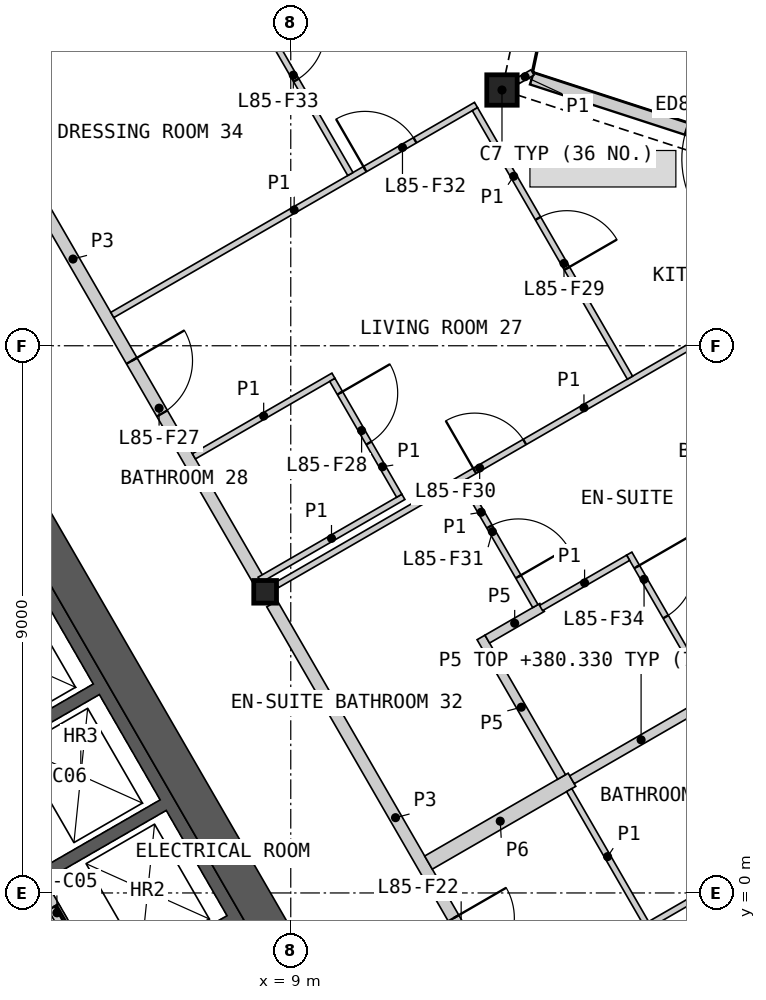
"""IFC4 building model, lengths in metres.
Left out: names, types, materials, properties, quantities, classifications, styles, units other than length and angle.
Written with IfcOpenShell. Run it as: python <this file> out.ifc"""

import sys

from ifc_helpers import new_model, si_unit, direction, frame, frame_2d, origin, origin_2d, place, context, subcontext, project, spatial, polyline, rectangle, hollow_rectangle, i_section, outline, extrude, element, fill, save


model = new_model("IFC4")
c1 = context("Model", 3, precision=1e-05, world=origin(), true_north=direction((0.0, 1.0)))
c2 = subcontext(c1, "Body", "Model", "MODEL_VIEW")
j1 = project(units=[si_unit("LENGTHUNIT", "METRE"), si_unit("PLANEANGLEUNIT", "RADIAN")], contexts=[c1])
p1 = place(None, origin())
s1 = spatial("IfcSite", under=j1, at=p1, CompositionType="ELEMENT")
p2 = place(p1, origin())
s2 = spatial("IfcBuilding", under=s1, at=p2, CompositionType="ELEMENT")
p3 = place(p2, frame((0.0, 0.0, 378.0)))
s3 = spatial("IfcBuildingStorey", under=s2, at=p3, CompositionType="ELEMENT", Elevation=378.0)
p4 = place(p3, frame((12.474, 13.206, 0.0), z_axis=(0.0, 0.0, 1.0), x_axis=(1.0, 0.0, 0.0)))
e1 = element("IfcColumn", 1, at=p4, inside=s3, PredefinedType="COLUMN", context=c2, shape_type="SweptSolid", body=[
    extrude(hollow_rectangle(XDim=0.5, YDim=0.5, WallThickness=0.03, at=origin_2d()), origin(), (0.0, 0.0, 1.0), 3.4),
])
p5 = place(p3, frame((8.578, 4.953, 0.0), z_axis=(0.0, 0.0, 1.0), x_axis=(1.0, 0.0, 0.0)))
e2 = element("IfcColumn", 2, at=p5, inside=s3, PredefinedType="COLUMN", context=c2, shape_type="SweptSolid", body=[
    extrude(i_section(OverallWidth=0.374, OverallDepth=0.372, WebThickness=0.016, FlangeThickness=0.026, at=origin_2d()), origin(), (0.0, 0.0, 1.0), 3.4),
])
p6 = place(p3, frame((19.25, 11.351, 0.0), z_axis=(0.0, 0.0, 1.0), x_axis=(-0.951060668786, 0.309004214029, 0.0)))
e3 = element("IfcWall", 3, at=p6, inside=s3, PredefinedType="SOLIDWALL", context=c2, shape_type="SweptSolid", body=[
    extrude(rectangle(XDim=6.609, YDim=0.2, at=frame_2d((3.305, 0.0))), origin(), (0.0, 0.0, 1.0), 2.634),
])
p7 = place(p6, frame((2.333, 0.0, 0.0)))
e4 = element("IfcOpeningElement", 4, at=p7, cuts=e3, PredefinedType="OPENING", context=c2, shape_type="SweptSolid", body=[
    extrude(rectangle(XDim=1.6, YDim=2.25, at=frame_2d((0.8, 1.125))), frame((0.0, 0.11, 0.0), z_axis=(0.0, -1.0, 0.0), x_axis=(1.0, 0.0, 0.0)), (0.0, 0.0, 1.0), 0.22),
])
p8 = place(p3, origin())
e5 = element("IfcWall", 5, at=p8, inside=s3, PredefinedType="SHEAR", context=c2, shape_type="SweptSolid", body=[
    extrude(outline(polyline([(1.561, 6.097), (3.731, 7.35), (8.231, -0.444), (6.061, -1.697), (5.96, -1.524), (7.952, -0.374), (6.952, 1.358), (4.96, 0.208), (4.861, 0.381), (6.852, 1.531), (5.852, 3.263), (3.861, 2.113), (3.76, 2.287), (5.752, 3.437), (4.752, 5.169), (2.76, 4.019), (2.66, 4.192), (4.652, 5.342), (3.652, 7.074), (1.66, 5.924), (1.561, 6.097)])), origin(), (0.0, 0.0, 1.0), 3.1),
])
p9 = place(p3, frame((5.817, -1.476, 0.0), z_axis=(0.0, 0.0, 1.0), x_axis=(-0.500002616675, 0.866023893041, 0.0)))
e6 = element("IfcWall", 6, at=p9, inside=s3, PredefinedType="SOLIDWALL", context=c2, shape_type="SweptSolid", body=[
    extrude(rectangle(XDim=8.373, YDim=0.2, at=frame_2d((4.187, 0.0))), origin(), (0.0, 0.0, 1.0), 3.1),
])
p10 = place(p9, frame((0.337, 0.0, 0.0)))
e7 = element("IfcOpeningElement", 7, at=p10, cuts=e6, PredefinedType="OPENING", context=c2, shape_type="SweptSolid", body=[
    extrude(rectangle(XDim=1.1, YDim=2.1, at=frame_2d((0.55, 1.05))), frame((0.0, 0.11, 0.0), z_axis=(0.0, -1.0, 0.0), x_axis=(1.0, 0.0, 0.0)), (0.0, 0.0, 1.0), 0.22),
])
p11 = place(p9, frame((2.537, 0.0, 0.0)))
e8 = element("IfcOpeningElement", 8, at=p11, cuts=e6, PredefinedType="OPENING", context=c2, shape_type="SweptSolid", body=[
    extrude(rectangle(XDim=1.1, YDim=2.1, at=frame_2d((0.55, 1.05))), frame((0.0, 0.11, 0.0), z_axis=(0.0, -1.0, 0.0), x_axis=(1.0, 0.0, 0.0)), (0.0, 0.0, 1.0), 0.22),
])
p12 = place(p9, frame((4.737, 0.0, 0.0)))
e9 = element("IfcOpeningElement", 9, at=p12, cuts=e6, PredefinedType="OPENING", context=c2, shape_type="SweptSolid", body=[
    extrude(rectangle(XDim=1.1, YDim=2.1, at=frame_2d((0.55, 1.05))), frame((0.0, 0.11, 0.0), z_axis=(0.0, -1.0, 0.0), x_axis=(1.0, 0.0, 0.0)), (0.0, 0.0, 1.0), 0.22),
])
p13 = place(p9, frame((7.037, 0.0, 0.0)))
e10 = element("IfcOpeningElement", 10, at=p13, cuts=e6, PredefinedType="OPENING", context=c2, shape_type="SweptSolid", body=[
    extrude(rectangle(XDim=0.9, YDim=2.1, at=frame_2d((0.45, 1.05))), frame((0.0, 0.11, 0.0), z_axis=(0.0, -1.0, 0.0), x_axis=(1.0, 0.0, 0.0)), (0.0, 0.0, 1.0), 0.22),
])
p14 = place(p3, frame((8.686, -0.634, 0.0), z_axis=(0.0, 0.0, 1.0), x_axis=(-0.500004601921, 0.866022746848, 0.0)))
e11 = element("IfcWall", 11, at=p14, inside=s3, PredefinedType="SHEAR", context=c2, shape_type="SweptSolid", body=[
    extrude(rectangle(XDim=16.853, YDim=0.6, at=frame_2d((8.426, 0.0))), origin(), (0.0, 0.0, 1.0), 3.1),
])
p15 = place(p3, frame((4.403, 12.185, 0.0), z_axis=(0.0, 0.0, 1.0), x_axis=(0.499992155518, -0.866029932751, 0.0)))
e12 = element("IfcWall", 12, at=p15, inside=s3, PredefinedType="PARTITIONING", context=c2, shape_type="SweptSolid", body=[
    extrude(rectangle(XDim=8.123, YDim=0.2, at=frame_2d((4.062, 0.0))), origin(), (0.0, 0.0, 1.0), 3.1),
])
p16 = place(p15, frame((3.963, 0.0, 0.0)))
e13 = element("IfcOpeningElement", 13, at=p16, cuts=e12, PredefinedType="OPENING", context=c2, shape_type="SweptSolid", body=[
    extrude(rectangle(XDim=1.0, YDim=2.1, at=frame_2d((0.5, 1.05))), frame((0.0, 0.11, 0.0), z_axis=(0.0, -1.0, 0.0), x_axis=(1.0, 0.0, 0.0)), (0.0, 0.0, 1.0), 0.22),
])
p17 = place(p3, frame((8.692, 4.756, 0.0), z_axis=(0.0, 0.0, 1.0), x_axis=(0.500001682468, -0.866024432409, 0.0)))
e14 = element("IfcWall", 14, at=p17, inside=s3, PredefinedType="PARTITIONING", context=c2, shape_type="SweptSolid", body=[
    extrude(rectangle(XDim=8.124, YDim=0.2, at=frame_2d((4.062, 0.0))), origin(), (0.0, 0.0, 1.0), 3.1),
])
p18 = place(p17, frame((5.97, 0.0, 0.0)))
e15 = element("IfcOpeningElement", 15, at=p18, cuts=e14, PredefinedType="OPENING", context=c2, shape_type="SweptSolid", body=[
    extrude(rectangle(XDim=1.0, YDim=2.1, at=frame_2d((0.5, 1.05))), frame((0.0, 0.11, 0.0), z_axis=(0.0, -1.0, 0.0), x_axis=(1.0, 0.0, 0.0)), (0.0, 0.0, 1.0), 0.22),
])
p19 = place(p3, frame((11.265, 0.5, 0.0), z_axis=(0.0, 0.0, 1.0), x_axis=(0.866051307416, 0.49995513091, 0.0)))
e16 = element("IfcWall", 16, at=p19, inside=s3, PredefinedType="PARTITIONING", context=c2, shape_type="SweptSolid", body=[
    extrude(rectangle(XDim=2.725, YDim=0.25, at=frame_2d((1.362, 0.0))), origin(), (0.0, 0.0, 1.0), 2.33),
])
p20 = place(p3, frame((13.625, 1.862, 0.0), z_axis=(0.0, 0.0, 1.0), x_axis=(0.866013657776, 0.500020344131, 0.0)))
e17 = element("IfcWall", 17, at=p20, inside=s3, PredefinedType="PLUMBINGWALL", context=c2, shape_type="SweptSolid", body=[
    extrude(rectangle(XDim=2.625, YDim=0.15, at=frame_2d((1.312, 0.0))), origin(), (0.0, 0.0, 1.0), 2.33),
])
p21 = place(p3, frame((12.129, 4.203, 0.0), z_axis=(0.0, 0.0, 1.0), x_axis=(0.499993606316, -0.866029095148, 0.0)))
e18 = element("IfcWall", 18, at=p21, inside=s3, PredefinedType="PLUMBINGWALL", context=c2, shape_type="SweptSolid", body=[
    extrude(rectangle(XDim=2.65, YDim=0.15, at=frame_2d((1.325, 0.0))), origin(), (0.0, 0.0, 1.0), 2.33),
])
p22 = place(p3, frame((12.232, 4.175, 0.0), z_axis=(0.0, 0.0, 1.0), x_axis=(0.866056787991, 0.499945637019, 0.0)))
e19 = element("IfcWall", 19, at=p22, inside=s3, PredefinedType="PLUMBINGWALL", context=c2, shape_type="SweptSolid", body=[
    extrude(rectangle(XDim=1.042, YDim=0.15, at=frame_2d((0.521, 0.0))), origin(), (0.0, 0.0, 1.0), 2.33),
])
p23 = place(p3, frame((13.865, -4.004, 0.0), z_axis=(0.0, 0.0, 1.0), x_axis=(0.866023404247, 0.500003463284, 0.0)))
e20 = element("IfcWall", 20, at=p23, inside=s3, PredefinedType="PARTITIONING", context=c2, shape_type="SweptSolid", body=[
    extrude(rectangle(XDim=11.782, YDim=0.1, at=frame_2d((5.891, 0.0))), origin(), (0.0, 0.0, 1.0), 2.33),
])
p24 = place(p23, frame((7.874, 0.0, 0.0)))
e21 = element("IfcOpeningElement", 21, at=p24, cuts=e20, PredefinedType="OPENING", context=c2, shape_type="SweptSolid", body=[
    extrude(rectangle(XDim=0.95, YDim=2.1, at=frame_2d((0.475, 1.05))), frame((0.0, 0.06, 0.0), z_axis=(0.0, -1.0, 0.0), x_axis=(1.0, 0.0, 0.0)), (0.0, 0.0, 1.0), 0.12),
])
p25 = place(p3, frame((8.775, 5.066, 0.0), z_axis=(0.0, 0.0, 1.0), x_axis=(0.866023724155, 0.500002909193, 0.0)))
e22 = element("IfcWall", 22, at=p25, inside=s3, PredefinedType="PARTITIONING", context=c2, shape_type="SweptSolid", body=[
    extrude(rectangle(XDim=11.655, YDim=0.1, at=frame_2d((5.827, 0.0))), origin(), (0.0, 0.0, 1.0), 2.33),
])
p26 = place(p25, frame((3.751, 0.0, 0.0)))
e23 = element("IfcOpeningElement", 23, at=p26, cuts=e22, PredefinedType="OPENING", context=c2, shape_type="SweptSolid", body=[
    extrude(rectangle(XDim=0.95, YDim=2.1, at=frame_2d((0.475, 1.05))), frame((0.0, 0.06, 0.0), z_axis=(0.0, -1.0, 0.0), x_axis=(1.0, 0.0, 0.0)), (0.0, 0.0, 1.0), 0.12),
])
p27 = place(p3, frame((6.065, 9.506, 0.0), z_axis=(0.0, 0.0, 1.0), x_axis=(0.866029020252, 0.499993736042, 0.0)))
e24 = element("IfcWall", 24, at=p27, inside=s3, PredefinedType="PARTITIONING", context=c2, shape_type="SweptSolid", body=[
    extrude(rectangle(XDim=6.907, YDim=0.1, at=frame_2d((3.454, 0.0))), origin(), (0.0, 0.0, 1.0), 2.33),
])
p28 = place(p27, frame((4.798, 0.0, 0.0)))
e25 = element("IfcOpeningElement", 25, at=p28, cuts=e24, PredefinedType="OPENING", context=c2, shape_type="SweptSolid", body=[
    extrude(rectangle(XDim=0.95, YDim=2.1, at=frame_2d((0.475, 1.05))), frame((0.0, 0.06, 0.0), z_axis=(0.0, -1.0, 0.0), x_axis=(1.0, 0.0, 0.0)), (0.0, 0.0, 1.0), 0.12),
])
p29 = place(p3, frame((14.567, 5.581, 0.0), z_axis=(0.0, 0.0, 1.0), x_axis=(0.499996545922, -0.866027397988, 0.0)))
e26 = element("IfcWall", 26, at=p29, inside=s3, PredefinedType="PARTITIONING", context=c2, shape_type="SweptSolid", body=[
    extrude(rectangle(XDim=5.5, YDim=0.1, at=frame_2d((2.75, 0.0))), origin(), (0.0, 0.0, 1.0), 2.33),
])
p30 = place(p29, frame((0.25, 0.0, 0.0)))
e27 = element("IfcOpeningElement", 27, at=p30, cuts=e26, PredefinedType="OPENING", context=c2, shape_type="SweptSolid", body=[
    extrude(rectangle(XDim=0.95, YDim=2.1, at=frame_2d((0.475, 1.05))), frame((0.0, 0.06, 0.0), z_axis=(0.0, -1.0, 0.0), x_axis=(1.0, 0.0, 0.0)), (0.0, 0.0, 1.0), 0.12),
])
p31 = place(p3, frame((7.468, 16.176, 0.0), z_axis=(0.0, 0.0, 1.0), x_axis=(0.499990214365, -0.86603105345, 0.0)))
e28 = element("IfcWall", 28, at=p31, inside=s3, PredefinedType="PARTITIONING", context=c2, shape_type="SweptSolid", body=[
    extrude(rectangle(XDim=5.025, YDim=0.1, at=frame_2d((2.512, 0.0))), origin(), (0.0, 0.0, 1.0), 2.33),
])
p32 = place(p31, frame((2.293, 0.0, 0.0)))
e29 = element("IfcOpeningElement", 29, at=p32, cuts=e28, PredefinedType="OPENING", context=c2, shape_type="SweptSolid", body=[
    extrude(rectangle(XDim=0.95, YDim=2.1, at=frame_2d((0.475, 1.05))), frame((0.0, 0.06, 0.0), z_axis=(0.0, -1.0, 0.0), x_axis=(1.0, 0.0, 0.0)), (0.0, 0.0, 1.0), 0.12),
])
p33 = place(p3, frame((12.029, 12.892, 0.0), z_axis=(0.0, 0.0, 1.0), x_axis=(0.500005610874, -0.86602216432, 0.0)))
e30 = element("IfcWall", 30, at=p33, inside=s3, PredefinedType="PARTITIONING", context=c2, shape_type="SweptSolid", body=[
    extrude(rectangle(XDim=5.1, YDim=0.1, at=frame_2d((2.55, 0.0))), origin(), (0.0, 0.0, 1.0), 2.33),
])
p34 = place(p33, frame((2.075, 0.0, 0.0)))
e31 = element("IfcOpeningElement", 31, at=p34, cuts=e30, PredefinedType="OPENING", context=c2, shape_type="SweptSolid", body=[
    extrude(rectangle(XDim=0.95, YDim=2.1, at=frame_2d((0.475, 1.05))), frame((0.0, 0.06, 0.0), z_axis=(0.0, -1.0, 0.0), x_axis=(1.0, 0.0, 0.0)), (0.0, 0.0, 1.0), 0.12),
])
p35 = place(p3, frame((14.823, -0.564, 0.0), z_axis=(0.0, 0.0, 1.0), x_axis=(0.866034573852, 0.49998411664, 0.0)))
e32 = element("IfcWall", 32, at=p35, inside=s3, PredefinedType="PARTITIONING", context=c2, shape_type="SweptSolid", body=[
    extrude(rectangle(XDim=2.8, YDim=0.1, at=frame_2d((1.4, 0.0))), origin(), (0.0, 0.0, 1.0), 2.33),
])
p36 = place(p35, frame((1.6, 0.0, 0.0)))
e33 = element("IfcOpeningElement", 33, at=p36, cuts=e32, PredefinedType="OPENING", context=c2, shape_type="SweptSolid", body=[
    extrude(rectangle(XDim=0.95, YDim=2.1, at=frame_2d((0.475, 1.05))), frame((0.0, 0.06, 0.0), z_axis=(0.0, -1.0, 0.0), x_axis=(1.0, 0.0, 0.0)), (0.0, 0.0, 1.0), 0.12),
])
p37 = place(p3, frame((13.579, 1.691, 0.0), z_axis=(0.0, 0.0, 1.0), x_axis=(0.500048846702, -0.865997200291, 0.0)))
e34 = element("IfcWall", 34, at=p37, inside=s3, PredefinedType="PARTITIONING", context=c2, shape_type="SweptSolid", body=[
    extrude(rectangle(XDim=2.525, YDim=0.1, at=frame_2d((1.263, 0.0))), origin(), (0.0, 0.0, 1.0), 2.33),
])
p38 = place(p3, frame((7.407, 7.182, 0.0), z_axis=(0.0, 0.0, 1.0), x_axis=(0.866052124492, 0.499953715521, 0.0)))
e35 = element("IfcWall", 35, at=p38, inside=s3, PredefinedType="PARTITIONING", context=c2, shape_type="SweptSolid", body=[
    extrude(rectangle(XDim=2.65, YDim=0.1, at=frame_2d((1.325, 0.0))), origin(), (0.0, 0.0, 1.0), 2.33),
])
p39 = place(p3, frame((8.488, 5.15, 0.0), z_axis=(0.0, 0.0, 1.0), x_axis=(0.866027727466, 0.499995975244, 0.0)))
e36 = element("IfcWall", 36, at=p39, inside=s3, PredefinedType="PARTITIONING", context=c2, shape_type="SweptSolid", body=[
    extrude(rectangle(XDim=2.73, YDim=0.1, at=frame_2d((1.365, 0.0))), origin(), (0.0, 0.0, 1.0), 2.33),
])
p40 = place(p3, frame((11.835, 6.775, 0.0), z_axis=(0.0, 0.0, 1.0), x_axis=(0.500030943131, -0.866007538022, 0.0)))
e37 = element("IfcWall", 37, at=p40, inside=s3, PredefinedType="PARTITIONING", context=c2, shape_type="SweptSolid", body=[
    extrude(rectangle(XDim=2.375, YDim=0.1, at=frame_2d((1.188, 0.0))), origin(), (0.0, 0.0, 1.0), 2.33),
])
p41 = place(p40, frame((0.867, 0.0, 0.0)))
e38 = element("IfcOpeningElement", 38, at=p41, cuts=e37, PredefinedType="OPENING", context=c2, shape_type="SweptSolid", body=[
    extrude(rectangle(XDim=0.95, YDim=2.1, at=frame_2d((0.475, 1.05))), frame((0.0, 0.06, 0.0), z_axis=(0.0, -1.0, 0.0), x_axis=(1.0, 0.0, 0.0)), (0.0, 0.0, 1.0), 0.12),
])
p42 = place(p3, frame((9.684, 8.438, 0.0), z_axis=(0.0, 0.0, 1.0), x_axis=(0.499994660107, -0.866028486751, 0.0)))
e39 = element("IfcWall", 39, at=p42, inside=s3, PredefinedType="PARTITIONING", context=c2, shape_type="SweptSolid", body=[
    extrude(rectangle(XDim=2.2, YDim=0.1, at=frame_2d((1.1, 0.0))), origin(), (0.0, 0.0, 1.0), 2.33),
])
p43 = place(p42, frame((0.25, 0.0, 0.0)))
e40 = element("IfcOpeningElement", 40, at=p43, cuts=e39, PredefinedType="OPENING", context=c2, shape_type="SweptSolid", body=[
    extrude(rectangle(XDim=0.95, YDim=2.1, at=frame_2d((0.475, 1.05))), frame((0.0, 0.06, 0.0), z_axis=(0.0, -1.0, 0.0), x_axis=(1.0, 0.0, 0.0)), (0.0, 0.0, 1.0), 0.12),
])
p44 = place(p3, frame((13.116, 4.686, 0.0), z_axis=(0.0, 0.0, 1.0), x_axis=(0.866072496716, 0.499918423778, 0.0)))
e41 = element("IfcWall", 41, at=p44, inside=s3, PredefinedType="PARTITIONING", context=c2, shape_type="SweptSolid", body=[
    extrude(rectangle(XDim=1.654, YDim=0.1, at=frame_2d((0.827, 0.0))), origin(), (0.0, 0.0, 1.0), 2.33),
])
p45 = place(p3, frame((12.734, 13.356, 0.0), z_axis=(0.0, 0.0, 1.0), x_axis=(0.865687176694, 0.50058536945, 0.0)))
e42 = element("IfcWall", 42, at=p45, inside=s3, PredefinedType="PARTITIONING", context=c2, shape_type="SweptSolid", body=[
    extrude(rectangle(XDim=0.278, YDim=0.1, at=frame_2d((0.139, 0.0))), origin(), (0.0, 0.0, 1.0), 2.33),
])
p46 = place(p10, origin())
e43 = element("IfcDoor", 43, at=p46, inside=s3, OperationType="SLIDING_TO_LEFT", PredefinedType="DOOR", context=c2, shape_type="SweptSolid", body=[
    extrude(rectangle(XDim=1.1, YDim=2.1, at=frame_2d((0.55, 1.05))), frame((0.0, 0.025, 0.0), z_axis=(0.0, -1.0, 0.0), x_axis=(1.0, 0.0, 0.0)), (0.0, 0.0, 1.0), 0.05),
])
fill(e7, e43)
p47 = place(p18, origin())
e44 = element("IfcDoor", 44, at=p47, inside=s3, OperationType="SINGLE_SWING_LEFT", PredefinedType="DOOR", context=c2, shape_type="SweptSolid", body=[
    extrude(rectangle(XDim=1.0, YDim=2.1, at=frame_2d((0.5, 1.05))), frame((0.0, 0.025, 0.0), z_axis=(0.0, -1.0, 0.0), x_axis=(1.0, 0.0, 0.0)), (0.0, 0.0, 1.0), 0.05),
])
fill(e15, e44)
p48 = place(p16, origin())
e45 = element("IfcDoor", 45, at=p48, inside=s3, OperationType="SINGLE_SWING_LEFT", PredefinedType="DOOR", context=c2, shape_type="SweptSolid", body=[
    extrude(rectangle(XDim=1.0, YDim=2.1, at=frame_2d((0.5, 1.05))), frame((0.0, 0.025, 0.0), z_axis=(0.0, -1.0, 0.0), x_axis=(1.0, 0.0, 0.0)), (0.0, 0.0, 1.0), 0.05),
])
fill(e13, e45)
p49 = place(p43, origin())
e46 = element("IfcDoor", 46, at=p49, inside=s3, OperationType="SINGLE_SWING_LEFT", PredefinedType="DOOR", context=c2, shape_type="SweptSolid", body=[
    extrude(rectangle(XDim=0.95, YDim=2.1, at=frame_2d((0.475, 1.05))), frame((0.0, 0.025, 0.0), z_axis=(0.0, -1.0, 0.0), x_axis=(1.0, 0.0, 0.0)), (0.0, 0.0, 1.0), 0.05),
])
fill(e40, e46)
p50 = place(p34, origin())
e47 = element("IfcDoor", 47, at=p50, inside=s3, OperationType="SINGLE_SWING_RIGHT", PredefinedType="DOOR", context=c2, shape_type="SweptSolid", body=[
    extrude(rectangle(XDim=0.95, YDim=2.1, at=frame_2d((0.475, 1.05))), frame((0.0, 0.025, 0.0), z_axis=(0.0, -1.0, 0.0), x_axis=(1.0, 0.0, 0.0)), (0.0, 0.0, 1.0), 0.05),
])
fill(e31, e47)
p51 = place(p26, origin())
e48 = element("IfcDoor", 48, at=p51, inside=s3, OperationType="SINGLE_SWING_LEFT", PredefinedType="DOOR", context=c2, shape_type="SweptSolid", body=[
    extrude(rectangle(XDim=0.95, YDim=2.1, at=frame_2d((0.475, 1.05))), frame((0.0, 0.025, 0.0), z_axis=(0.0, -1.0, 0.0), x_axis=(1.0, 0.0, 0.0)), (0.0, 0.0, 1.0), 0.05),
])
fill(e23, e48)
p52 = place(p41, origin())
e49 = element("IfcDoor", 49, at=p52, inside=s3, OperationType="SINGLE_SWING_RIGHT", PredefinedType="DOOR", context=c2, shape_type="SweptSolid", body=[
    extrude(rectangle(XDim=0.95, YDim=2.1, at=frame_2d((0.475, 1.05))), frame((0.0, 0.025, 0.0), z_axis=(0.0, -1.0, 0.0), x_axis=(1.0, 0.0, 0.0)), (0.0, 0.0, 1.0), 0.05),
])
fill(e38, e49)
p53 = place(p28, origin())
e50 = element("IfcDoor", 50, at=p53, inside=s3, OperationType="SINGLE_SWING_LEFT", PredefinedType="DOOR", context=c2, shape_type="SweptSolid", body=[
    extrude(rectangle(XDim=0.95, YDim=2.1, at=frame_2d((0.475, 1.05))), frame((0.0, 0.025, 0.0), z_axis=(0.0, -1.0, 0.0), x_axis=(1.0, 0.0, 0.0)), (0.0, 0.0, 1.0), 0.05),
])
fill(e25, e50)
p54 = place(p32, origin())
e51 = element("IfcDoor", 51, at=p54, inside=s3, OperationType="SINGLE_SWING_LEFT", PredefinedType="DOOR", context=c2, shape_type="SweptSolid", body=[
    extrude(rectangle(XDim=0.95, YDim=2.1, at=frame_2d((0.475, 1.05))), frame((0.0, 0.025, 0.0), z_axis=(0.0, -1.0, 0.0), x_axis=(1.0, 0.0, 0.0)), (0.0, 0.0, 1.0), 0.05),
])
fill(e29, e51)
p55 = place(p30, origin())
e52 = element("IfcDoor", 52, at=p55, inside=s3, OperationType="SINGLE_SWING_LEFT", PredefinedType="DOOR", context=c2, shape_type="SweptSolid", body=[
    extrude(rectangle(XDim=0.95, YDim=2.1, at=frame_2d((0.475, 1.05))), frame((0.0, 0.025, 0.0), z_axis=(0.0, -1.0, 0.0), x_axis=(1.0, 0.0, 0.0)), (0.0, 0.0, 1.0), 0.05),
])
fill(e27, e52)
save(model, sys.argv[1])
